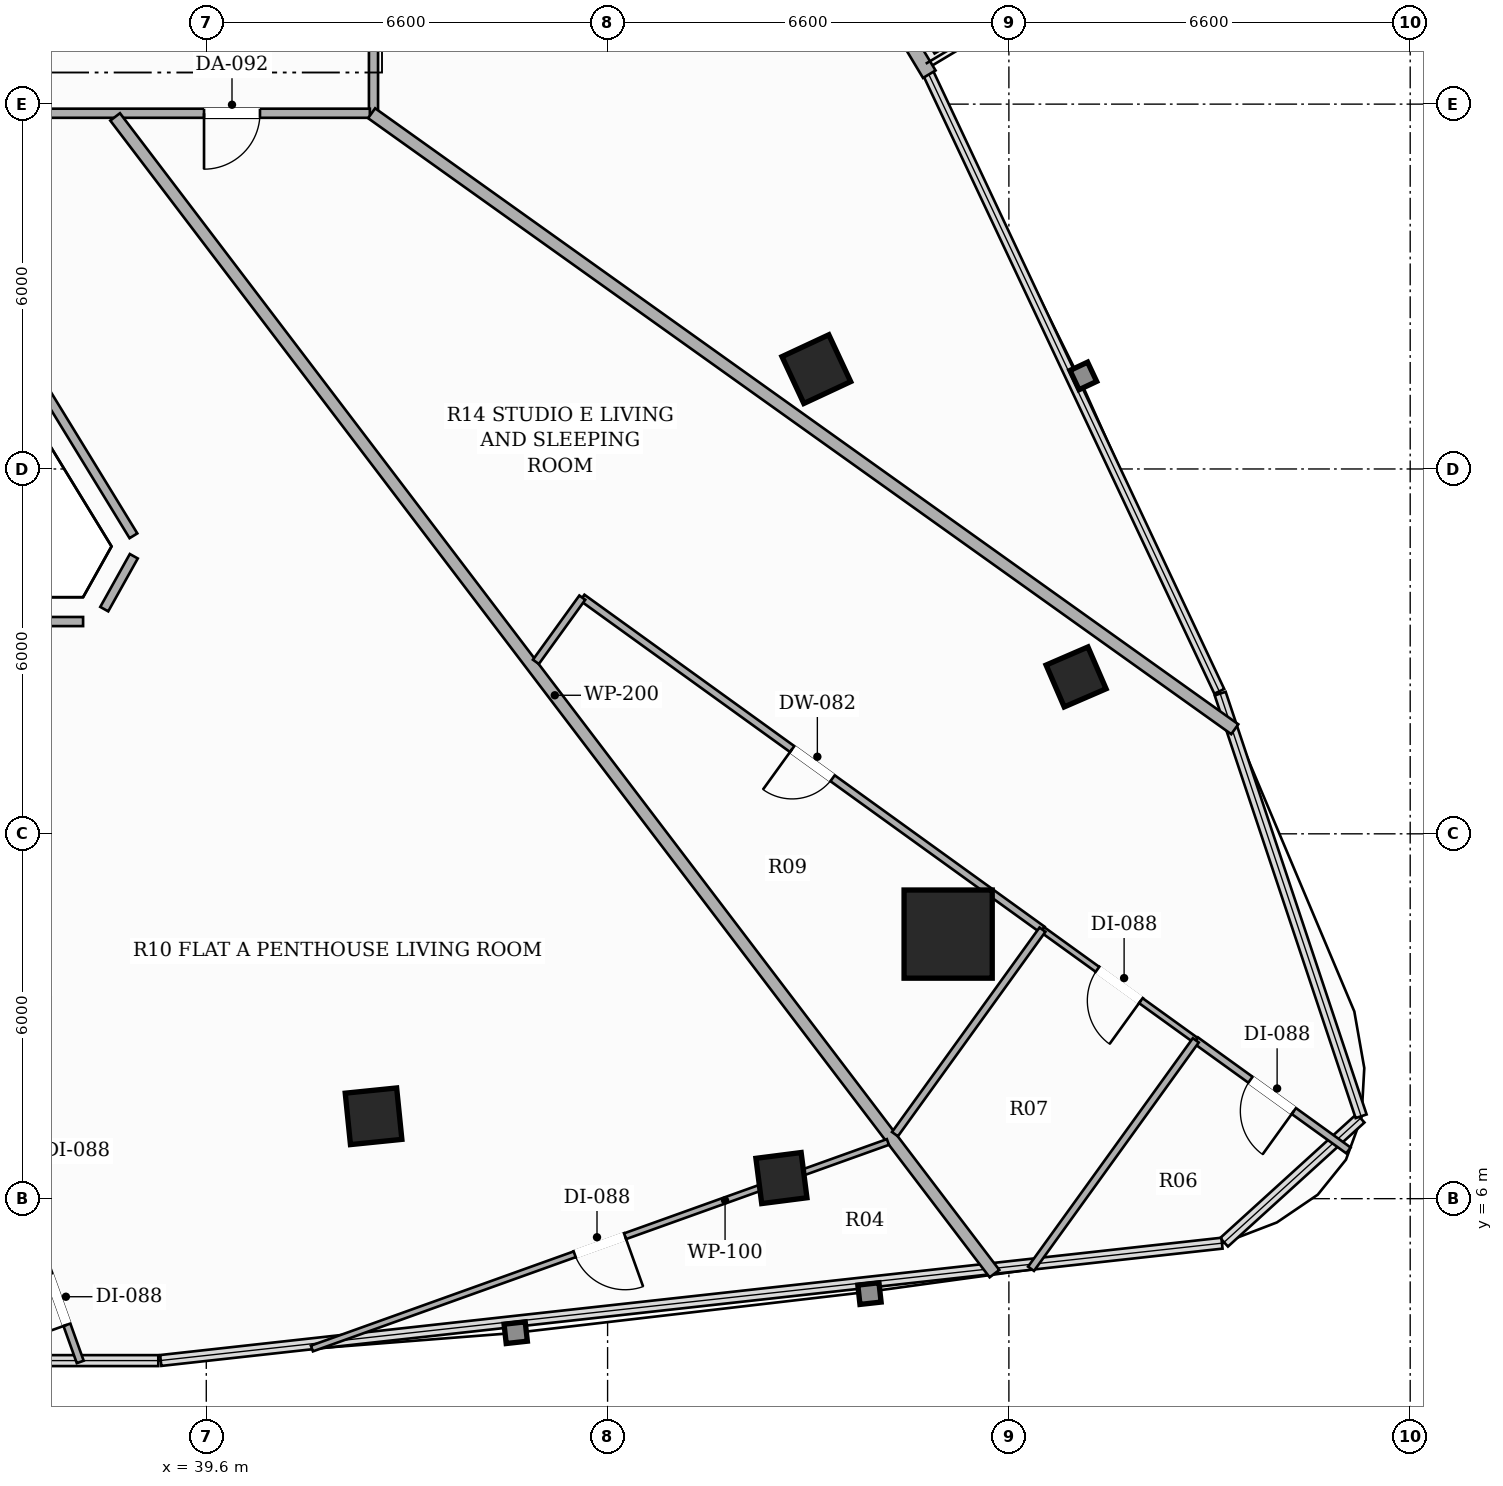
"""IFC4 building model, lengths in metres.
Left out: names, types, materials, properties, quantities, classifications, styles, units other than length and angle.
Written with IfcOpenShell. Run it as: python <this file> out.ifc"""

import sys

from ifc_helpers import new_model, si_unit, direction, frame, frame_2d, origin, origin_2d, place, context, subcontext, project, spatial, rectangle, hollow_rectangle, extrude, element, fill, save


model = new_model("IFC4")
c1 = context("Model", 3, precision=1e-05, world=origin(), true_north=direction((0.0, 1.0)))
c2 = subcontext(c1, "Body", "Model", "MODEL_VIEW")
j1 = project(units=[si_unit("LENGTHUNIT", "METRE"), si_unit("PLANEANGLEUNIT", "RADIAN")], contexts=[c1])
p1 = place(None, origin())
s1 = spatial("IfcSite", under=j1, at=p1, CompositionType="ELEMENT")
p2 = place(p1, origin())
s2 = spatial("IfcBuilding", under=s1, at=p2, CompositionType="ELEMENT")
p3 = place(p2, frame((0.0, 0.0, 139.7)))
s3 = spatial("IfcBuildingStorey", under=s2, at=p3, CompositionType="ELEMENT", Elevation=139.7)
p4 = place(p3, frame((51.801, 10.351, 0.0), z_axis=(0.0, 0.0, 1.0), x_axis=(1.0, 0.0, 0.0)))
e1 = element("IfcColumn", 1, at=p4, inside=s3, PredefinedType="COLUMN", context=c2, shape_type="SweptSolid", body=[
    extrude(hollow_rectangle(XDim=1.45, YDim=1.45, WallThickness=0.045, at=origin_2d()), origin(), (0.0, 0.0, 1.0), 3.3),
])
for number, where, z_axis, x_axis in (
    (2, (42.351, 7.355, 0.0), (0.0, 0.0, 1.0), (0.995, 0.101, 0.0)),
    (3, (49.633, 19.642, 0.0), (0.0, 0.0, 1.0), (-0.423, 0.906, 0.0)),
):
    element("IfcColumn", number, at=place(p3, frame(where, z_axis=z_axis, x_axis=x_axis)), inside=s3, PredefinedType="COLUMN", context=c2, shape_type="SweptSolid", body=[
        extrude(hollow_rectangle(XDim=0.85, YDim=0.85, WallThickness=0.028, at=origin_2d()), origin(), (0.0, 0.0, 1.0), 3.3),
    ])
for number, where, z_axis, x_axis in (
    (4, (49.059, 6.339, 0.0), (0.0, 0.0, 1.0), (0.992, 0.127, 0.0)),
    (5, (53.905, 14.58, 0.0), (0.0, 0.0, 1.0), (-0.397, 0.918, 0.0)),
):
    element("IfcColumn", number, at=place(p3, frame(where, z_axis=z_axis, x_axis=x_axis)), inside=s3, PredefinedType="COLUMN", context=c2, shape_type="SweptSolid", body=[
        extrude(hollow_rectangle(XDim=0.75, YDim=0.75, WallThickness=0.025, at=origin_2d()), origin(), (0.0, 0.0, 1.0), 3.3),
    ])
p5 = place(p3, frame((51.491, 24.492, 0.0), z_axis=(0.0, 0.0, 1.0), x_axis=(-0.514364263751, 0.857571807009, 0.0)))
e6 = element("IfcWall", 6, at=p5, inside=s3, PredefinedType="SOLIDWALL", context=c2, shape_type="SweptSolid", body=[
    extrude(rectangle(XDim=11.468, YDim=0.24, at=frame_2d((5.734, 0.0))), origin(), (0.0, 0.0, 1.0), 2.624),
])
p6 = place(p5, frame((8.972, 0.0, 0.0)))
e7 = element("IfcOpeningElement", 7, at=p6, cuts=e6, PredefinedType="OPENING", context=c2, shape_type="SweptSolid", body=[
    extrude(rectangle(XDim=1.8, YDim=2.2, at=frame_2d((0.9, 1.1))), frame((0.0, 0.13, 0.0), z_axis=(0.0, -1.0, 0.0), x_axis=(1.0, 0.0, 0.0)), (0.0, 0.0, 1.0), 0.26),
])
p7 = place(p3, frame((42.35, 28.34, 0.0), z_axis=(0.0, 0.0, 1.0), x_axis=(0.0, -1.0, 0.0)))
e8 = element("IfcWall", 8, at=p7, inside=s3, PredefinedType="PARTITIONING", context=c2, shape_type="SweptSolid", body=[
    extrude(rectangle(XDim=4.49, YDim=0.15, at=frame_2d((2.245, 0.0))), origin(), (0.0, 0.0, 1.0), 2.721),
])
p8 = place(p7, frame((1.805, 0.0, 0.0)))
e9 = element("IfcOpeningElement", 9, at=p8, cuts=e8, PredefinedType="OPENING", context=c2, shape_type="SweptSolid", body=[
    extrude(rectangle(XDim=0.88, YDim=2.1, at=frame_2d((0.44, 1.05))), frame((0.0, 0.085, 0.0), z_axis=(0.0, -1.0, 0.0), x_axis=(1.0, 0.0, 0.0)), (0.0, 0.0, 1.0), 0.17),
])
p9 = place(p3, frame((42.29, 23.85, 0.0), z_axis=(0.0, 0.0, 1.0), x_axis=(-1.0, 0.0, 0.0)))
e10 = element("IfcWall", 10, at=p9, inside=s3, PredefinedType="PARTITIONING", context=c2, shape_type="SweptSolid", body=[
    extrude(rectangle(XDim=8.134, YDim=0.15, at=frame_2d((4.067, 0.0))), origin(), (0.0, 0.0, 1.0), 2.492),
])
p10 = place(p9, frame((5.546, 0.0, 0.0)))
e11 = element("IfcOpeningElement", 11, at=p10, cuts=e10, PredefinedType="OPENING", context=c2, shape_type="SweptSolid", body=[
    extrude(rectangle(XDim=0.92, YDim=2.15, at=frame_2d((0.46, 1.075))), frame((0.0, 0.085, 0.0), z_axis=(0.0, -1.0, 0.0), x_axis=(1.0, 0.0, 0.0)), (0.0, 0.0, 1.0), 0.17),
])
p11 = place(p9, frame((1.807, 0.0, 0.0)))
e12 = element("IfcOpeningElement", 12, at=p11, cuts=e10, PredefinedType="OPENING", context=c2, shape_type="SweptSolid", body=[
    extrude(rectangle(XDim=0.92, YDim=2.15, at=frame_2d((0.46, 1.075))), frame((0.0, 0.085, 0.0), z_axis=(0.0, -1.0, 0.0), x_axis=(1.0, 0.0, 0.0)), (0.0, 0.0, 1.0), 0.17),
])
p12 = place(p3, frame((34.188, 23.79, 0.0), z_axis=(0.0, 0.0, 1.0), x_axis=(0.521816809014, -0.853057570057, 0.0)))
e13 = element("IfcWall", 13, at=p12, inside=s3, PredefinedType="PARTITIONING", context=c2, shape_type="SweptSolid", body=[
    extrude(rectangle(XDim=8.076, YDim=0.15, at=frame_2d((4.038, 0.0))), origin(), (0.0, 0.0, 1.0), 2.721),
])
p13 = place(p3, frame((38.408, 16.565, 0.0), z_axis=(0.0, 0.0, 1.0), x_axis=(-0.48761814532, -0.873057010942, 0.0)))
e14 = element("IfcWall", 14, at=p13, inside=s3, PredefinedType="PARTITIONING", context=c2, shape_type="SweptSolid", body=[
    extrude(rectangle(XDim=0.996, YDim=0.15, at=frame_2d((0.498, 0.0))), origin(), (0.0, 0.0, 1.0), 3.06),
])
p14 = place(p3, frame((37.574, 15.491, 0.0), z_axis=(0.0, 0.0, 1.0), x_axis=(-1.0, 0.0, 0.0)))
e15 = element("IfcWall", 15, at=p14, inside=s3, PredefinedType="PARTITIONING", context=c2, shape_type="SweptSolid", body=[
    extrude(rectangle(XDim=9.148, YDim=0.15, at=frame_2d((4.574, 0.0))), origin(), (0.0, 0.0, 1.0), 2.721),
])
p15 = place(p3, frame((38.101, 23.79, 0.0), z_axis=(0.0, 0.0, 1.0), x_axis=(0.605201904092, -0.796072016393, 0.0)))
e16 = element("IfcWall", 16, at=p15, inside=s3, PredefinedType="PARTITIONING", context=c2, shape_type="SweptSolid", body=[
    extrude(rectangle(XDim=23.896, YDim=0.2, at=frame_2d((11.948, 0.0))), origin(), (0.0, 0.0, 1.0), 2.413),
])
p16 = place(p3, frame((56.515, 13.72, 0.0), z_axis=(0.0, 0.0, 1.0), x_axis=(-0.813997291107, 0.580868668522, 0.0)))
e17 = element("IfcWall", 17, at=p16, inside=s3, PredefinedType="PARTITIONING", context=c2, shape_type="SweptSolid", body=[
    extrude(rectangle(XDim=17.44, YDim=0.2, at=frame_2d((8.72, 0.0))), origin(), (0.0, 0.0, 1.0), 2.413),
])
p17 = place(p3, frame((37.527, 3.315, 0.0), z_axis=(0.0, 0.0, 1.0), x_axis=(-0.337393850622, 0.9413635799, 0.0)))
e18 = element("IfcWall", 18, at=p17, inside=s3, PredefinedType="PARTITIONING", context=c2, shape_type="SweptSolid", body=[
    extrude(rectangle(XDim=2.179, YDim=0.12, at=frame_2d((1.089, 0.0))), origin(), (0.0, 0.0, 1.0), 3.06),
])
p18 = place(p17, frame((0.649, 0.0, 0.0)))
e19 = element("IfcOpeningElement", 19, at=p18, cuts=e18, PredefinedType="OPENING", context=c2, shape_type="SweptSolid", body=[
    extrude(rectangle(XDim=0.88, YDim=2.1, at=frame_2d((0.44, 1.05))), frame((0.0, 0.07, 0.0), z_axis=(0.0, -1.0, 0.0), x_axis=(1.0, 0.0, 0.0)), (0.0, 0.0, 1.0), 0.14),
])
p19 = place(p3, frame((50.81, 6.932, 0.0), z_axis=(0.0, 0.0, 1.0), x_axis=(-0.941340567411, -0.337458050943, 0.0)))
e20 = element("IfcWall", 20, at=p19, inside=s3, PredefinedType="PARTITIONING", context=c2, shape_type="SweptSolid", body=[
    extrude(rectangle(XDim=10.063, YDim=0.1, at=frame_2d((5.032, 0.0))), origin(), (0.0, 0.0, 1.0), 2.413),
])
p20 = place(p19, frame((4.592, 0.0, 0.0)))
e21 = element("IfcOpeningElement", 21, at=p20, cuts=e20, PredefinedType="OPENING", context=c2, shape_type="SweptSolid", body=[
    extrude(rectangle(XDim=0.88, YDim=2.1, at=frame_2d((0.44, 1.05))), frame((0.0, 0.06, 0.0), z_axis=(0.0, -1.0, 0.0), x_axis=(1.0, 0.0, 0.0)), (0.0, 0.0, 1.0), 0.12),
])
p21 = place(p3, frame((53.352, 10.424, 0.0), z_axis=(0.0, 0.0, 1.0), x_axis=(-0.810979209295, 0.585074971343, 0.0)))
e22 = element("IfcWall", 22, at=p21, inside=s3, PredefinedType="PARTITIONING", context=c2, shape_type="SweptSolid", body=[
    extrude(rectangle(XDim=9.332, YDim=0.12, at=frame_2d((4.666, 0.0))), origin(), (0.0, 0.0, 1.0), 2.413),
])
p22 = place(p21, frame((4.256, 0.0, 0.0)))
e23 = element("IfcOpeningElement", 23, at=p22, cuts=e22, PredefinedType="OPENING", context=c2, shape_type="SweptSolid", body=[
    extrude(rectangle(XDim=0.82, YDim=2.1, at=frame_2d((0.41, 1.05))), frame((0.0, 0.07, 0.0), z_axis=(0.0, -1.0, 0.0), x_axis=(1.0, 0.0, 0.0)), (0.0, 0.0, 1.0), 0.14),
])
p23 = place(p3, frame((45.784, 15.884, 0.0), z_axis=(0.0, 0.0, 1.0), x_axis=(-0.58557264979, -0.810619930558, 0.0)))
e24 = element("IfcWall", 24, at=p23, inside=s3, PredefinedType="PARTITIONING", context=c2, shape_type="SweptSolid", body=[
    extrude(rectangle(XDim=1.303, YDim=0.12, at=frame_2d((0.651, 0.0))), origin(), (0.0, 0.0, 1.0), 2.721),
])
p24 = place(p3, frame((58.385, 6.793, 0.0), z_axis=(0.0, 0.0, 1.0), x_axis=(-0.811055436316, 0.584969297675, 0.0)))
e25 = element("IfcWall", 25, at=p24, inside=s3, PredefinedType="PARTITIONING", context=c2, shape_type="SweptSolid", body=[
    extrude(rectangle(XDim=3.096, YDim=0.12, at=frame_2d((1.548, 0.0))), origin(), (0.0, 0.0, 1.0), 3.06),
])
p25 = place(p24, frame((1.108, 0.0, 0.0)))
e26 = element("IfcOpeningElement", 26, at=p25, cuts=e25, PredefinedType="OPENING", context=c2, shape_type="SweptSolid", body=[
    extrude(rectangle(XDim=0.88, YDim=2.1, at=frame_2d((0.44, 1.05))), frame((0.0, 0.07, 0.0), z_axis=(0.0, -1.0, 0.0), x_axis=(1.0, 0.0, 0.0)), (0.0, 0.0, 1.0), 0.14),
])
p26 = place(p3, frame((55.874, 8.604, 0.0), z_axis=(0.0, 0.0, 1.0), x_axis=(-0.810886170902, 0.585203911333, 0.0)))
e27 = element("IfcWall", 27, at=p26, inside=s3, PredefinedType="PARTITIONING", context=c2, shape_type="SweptSolid", body=[
    extrude(rectangle(XDim=3.11, YDim=0.1, at=frame_2d((1.555, 0.0))), origin(), (0.0, 0.0, 1.0), 2.619),
])
p27 = place(p26, frame((1.115, 0.0, 0.0)))
e28 = element("IfcOpeningElement", 28, at=p27, cuts=e27, PredefinedType="OPENING", context=c2, shape_type="SweptSolid", body=[
    extrude(rectangle(XDim=0.88, YDim=2.1, at=frame_2d((0.44, 1.05))), frame((0.0, 0.06, 0.0), z_axis=(0.0, -1.0, 0.0), x_axis=(1.0, 0.0, 0.0)), (0.0, 0.0, 1.0), 0.12),
])
p28 = place(p3, frame((53.352, 10.424, 0.0), z_axis=(0.0, 0.0, 1.0), x_axis=(-0.585041198475, -0.811003573412, 0.0)))
e29 = element("IfcWall", 29, at=p28, inside=s3, PredefinedType="PARTITIONING", context=c2, shape_type="SweptSolid", body=[
    extrude(rectangle(XDim=4.147, YDim=0.12, at=frame_2d((2.073, 0.0))), origin(), (0.0, 0.0, 1.0), 2.619),
])
p29 = place(p3, frame((53.164, 4.847, 0.0), z_axis=(0.0, 0.0, 1.0), x_axis=(0.58499591955, 0.81103623477, 0.0)))
e30 = element("IfcWall", 30, at=p29, inside=s3, PredefinedType="PARTITIONING", context=c2, shape_type="SweptSolid", body=[
    extrude(rectangle(XDim=4.632, YDim=0.12, at=frame_2d((2.316, 0.0))), origin(), (0.0, 0.0, 1.0), 3.06),
])
p30 = place(p18, origin())
e31 = element("IfcDoor", 31, at=p30, inside=s3, OperationType="SINGLE_SWING_LEFT", PredefinedType="DOOR", context=c2, shape_type="SweptSolid", body=[
    extrude(rectangle(XDim=0.88, YDim=2.1, at=frame_2d((0.44, 1.05))), frame((0.0, 0.025, 0.0), z_axis=(0.0, -1.0, 0.0), x_axis=(1.0, 0.0, 0.0)), (0.0, 0.0, 1.0), 0.05),
])
fill(e19, e31)
p31 = place(p20, origin())
e32 = element("IfcDoor", 32, at=p31, inside=s3, OperationType="SINGLE_SWING_LEFT", PredefinedType="DOOR", context=c2, shape_type="SweptSolid", body=[
    extrude(rectangle(XDim=0.88, YDim=2.1, at=frame_2d((0.44, 1.05))), frame((0.0, 0.025, 0.0), z_axis=(0.0, -1.0, 0.0), x_axis=(1.0, 0.0, 0.0)), (0.0, 0.0, 1.0), 0.05),
])
fill(e21, e32)
p32 = place(p11, origin())
e33 = element("IfcDoor", 33, at=p32, inside=s3, OperationType="SINGLE_SWING_RIGHT", PredefinedType="DOOR", context=c2, shape_type="SweptSolid", body=[
    extrude(rectangle(XDim=0.92, YDim=2.15, at=frame_2d((0.46, 1.075))), frame((0.0, 0.025, 0.0), z_axis=(0.0, -1.0, 0.0), x_axis=(1.0, 0.0, 0.0)), (0.0, 0.0, 1.0), 0.05),
])
fill(e12, e33)
p33 = place(p22, origin())
e34 = element("IfcDoor", 34, at=p33, inside=s3, OperationType="SINGLE_SWING_RIGHT", PredefinedType="DOOR", context=c2, shape_type="SweptSolid", body=[
    extrude(rectangle(XDim=0.82, YDim=2.1, at=frame_2d((0.41, 1.05))), frame((0.0, 0.025, 0.0), z_axis=(0.0, -1.0, 0.0), x_axis=(1.0, 0.0, 0.0)), (0.0, 0.0, 1.0), 0.05),
])
fill(e23, e34)
p34 = place(p25, origin())
e35 = element("IfcDoor", 35, at=p34, inside=s3, OperationType="SINGLE_SWING_LEFT", PredefinedType="DOOR", context=c2, shape_type="SweptSolid", body=[
    extrude(rectangle(XDim=0.88, YDim=2.1, at=frame_2d((0.44, 1.05))), frame((0.0, 0.025, 0.0), z_axis=(0.0, -1.0, 0.0), x_axis=(1.0, 0.0, 0.0)), (0.0, 0.0, 1.0), 0.05),
])
fill(e26, e35)
p35 = place(p27, origin())
e36 = element("IfcDoor", 36, at=p35, inside=s3, OperationType="SINGLE_SWING_LEFT", PredefinedType="DOOR", context=c2, shape_type="SweptSolid", body=[
    extrude(rectangle(XDim=0.88, YDim=2.1, at=frame_2d((0.44, 1.05))), frame((0.0, 0.025, 0.0), z_axis=(0.0, -1.0, 0.0), x_axis=(1.0, 0.0, 0.0)), (0.0, 0.0, 1.0), 0.05),
])
fill(e28, e36)
save(model, sys.argv[1])
